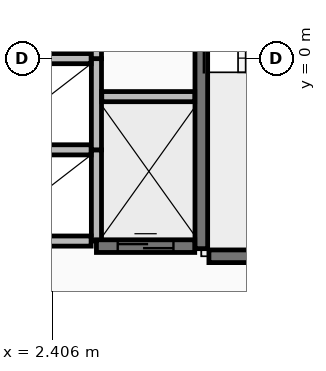
"""IFC4 building model, lengths in metres.
Left out: names, types, materials, properties, quantities, classifications, styles, units other than length and angle.
Written with IfcOpenShell. Run it as: python <this file> out.ifc"""

import sys

from ifc_helpers import new_model, si_unit, direction, frame, frame_2d, origin, place, context, subcontext, project, spatial, rectangle, extrude, element, fill, save


model = new_model("IFC4")
c1 = context("Model", 3, precision=1e-05, world=origin(), true_north=direction((0.0, 1.0)))
c2 = subcontext(c1, "Body", "Model", "MODEL_VIEW")
j1 = project(units=[si_unit("LENGTHUNIT", "METRE"), si_unit("PLANEANGLEUNIT", "RADIAN")], contexts=[c1])
p1 = place(None, origin())
s1 = spatial("IfcSite", under=j1, at=p1, CompositionType="ELEMENT")
p2 = place(p1, origin())
s2 = spatial("IfcBuilding", under=s1, at=p2, CompositionType="ELEMENT")
p3 = place(p2, frame((0.0, 0.0, 126.85)))
s3 = spatial("IfcBuildingStorey", under=s2, at=p3, CompositionType="ELEMENT", Elevation=126.85)
p4 = place(p3, frame((5.35, -3.75, 0.0), z_axis=(0.0, 0.0, 1.0), x_axis=(0.0, 1.0, 0.0)))
e1 = element("IfcWall", 1, at=p4, inside=s3, PredefinedType="SHEAR", context=c2, shape_type="SweptSolid", body=[
    extrude(rectangle(XDim=7.3, YDim=0.25, at=frame_2d((3.65, 0.0))), origin(), (0.0, 0.0, 1.0), 3.41),
])
p5 = place(p3, frame((5.5, -3.9, 0.0), z_axis=(0.0, 0.0, 1.0), x_axis=(1.0, 0.0, 0.0)))
e2 = element("IfcWall", 2, at=p5, inside=s3, PredefinedType="SHEAR", context=c2, shape_type="SweptSolid", body=[
    extrude(rectangle(XDim=3.0, YDim=0.25, at=frame_2d((1.5, 0.0))), origin(), (0.0, 0.0, 1.0), 3.41),
])
p6 = place(p3, frame((3.28, -3.6, 0.0), z_axis=(0.0, 0.0, 1.0), x_axis=(0.0, 1.0, 0.0)))
e3 = element("IfcWall", 3, at=p6, inside=s3, PredefinedType="PARTITIONING", context=c2, shape_type="SweptSolid", body=[
    extrude(rectangle(XDim=1.8, YDim=0.2, at=frame_2d((0.9, 0.0))), origin(), (0.0, 0.0, 1.0), 3.41),
])
for number, where, z_axis, x_axis in (
    (4, (1.13, -3.6, 0.0), (0.0, 0.0, 1.0), (1.0, 0.0, 0.0)),
    (5, (1.13, -1.8, 0.0), (0.0, 0.0, 1.0), (1.0, 0.0, 0.0)),
):
    element("IfcWall", number, at=place(p3, frame(where, z_axis=z_axis, x_axis=x_axis)), inside=s3, PredefinedType="PARTITIONING", context=c2, shape_type="SweptSolid", body=[
        extrude(rectangle(XDim=2.045, YDim=0.2, at=frame_2d((1.022, 0.0))), origin(), (0.0, 0.0, 1.0), 3.41),
    ])
p7 = place(p3, frame((3.28, -1.8, 0.0), z_axis=(0.0, 0.0, 1.0), x_axis=(0.0, 1.0, 0.0)))
e6 = element("IfcWall", 6, at=p7, inside=s3, PredefinedType="PARTITIONING", context=c2, shape_type="SweptSolid", body=[
    extrude(rectangle(XDim=1.8, YDim=0.2, at=frame_2d((0.9, 0.0))), origin(), (0.0, 0.0, 1.0), 3.41),
])
p8 = place(p3, frame((1.13, 0.0, 0.0), z_axis=(0.0, 0.0, 1.0), x_axis=(1.0, 0.0, 0.0)))
e7 = element("IfcWall", 7, at=p8, inside=s3, PredefinedType="PARTITIONING", context=c2, shape_type="SweptSolid", body=[
    extrude(rectangle(XDim=2.045, YDim=0.2, at=frame_2d((1.022, 0.0))), origin(), (0.0, 0.0, 1.0), 3.41),
])
p9 = place(p3, frame((3.28, 0.0, 0.0), z_axis=(0.0, 0.0, 1.0), x_axis=(0.0, 1.0, 0.0)))
e8 = element("IfcWall", 8, at=p9, inside=s3, PredefinedType="PARTITIONING", context=c2, shape_type="SweptSolid", body=[
    extrude(rectangle(XDim=1.8, YDim=0.2, at=frame_2d((0.9, 0.0))), origin(), (0.0, 0.0, 1.0), 3.41),
])
p10 = place(p3, frame((3.28, -3.7, 0.0), z_axis=(0.0, 0.0, 1.0), x_axis=(1.0, 0.0, 0.0)))
e9 = element("IfcWall", 9, at=p10, inside=s3, PredefinedType="SHEAR", context=c2, shape_type="SweptSolid", body=[
    extrude(rectangle(XDim=1.94, YDim=0.25, at=frame_2d((0.97, 0.0))), origin(), (0.0, 0.0, 1.0), 3.41),
])
p11 = place(p10, frame((0.42, 0.0, 0.0)))
e10 = element("IfcOpeningElement", 10, at=p11, cuts=e9, PredefinedType="OPENING", context=c2, shape_type="SweptSolid", body=[
    extrude(rectangle(XDim=1.1, YDim=2.2, at=frame_2d((0.55, 1.1))), frame((0.0, 0.135, 0.0), z_axis=(0.0, -1.0, 0.0), x_axis=(1.0, 0.0, 0.0)), (0.0, 0.0, 1.0), 0.27),
])
p12 = place(p3, frame((3.385, -0.75, 0.0), z_axis=(0.0, 0.0, 1.0), x_axis=(1.0, 0.0, 0.0)))
e11 = element("IfcWall", 11, at=p12, inside=s3, PredefinedType="PARTITIONING", context=c2, shape_type="SweptSolid", body=[
    extrude(rectangle(XDim=1.835, YDim=0.2, at=frame_2d((0.917, 0.0))), origin(), (0.0, 0.0, 1.0), 3.41),
])
p13 = place(p11, origin())
e12 = element("IfcDoor", 12, at=p13, inside=s3, OperationType="SLIDING_TO_LEFT", PredefinedType="DOOR", context=c2, shape_type="SweptSolid", body=[
    extrude(rectangle(XDim=1.1, YDim=2.2, at=frame_2d((0.55, 1.1))), frame((0.0, 0.025, 0.0), z_axis=(0.0, -1.0, 0.0), x_axis=(1.0, 0.0, 0.0)), (0.0, 0.0, 1.0), 0.05),
])
fill(e10, e12)
save(model, sys.argv[1])
